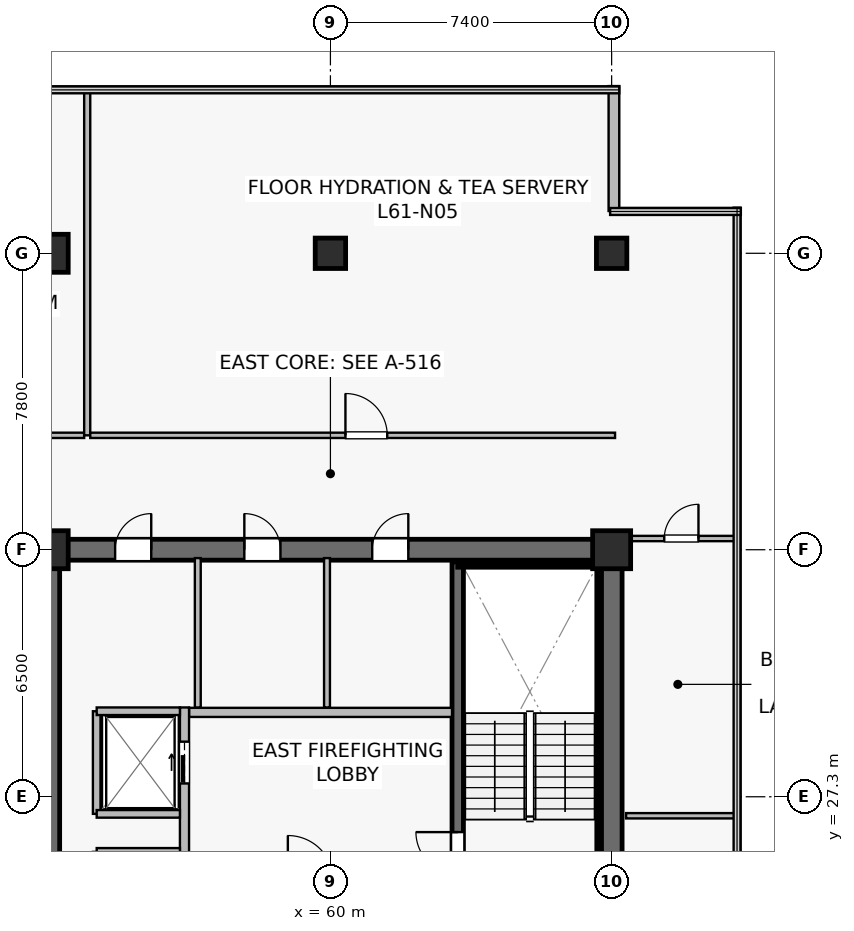
"""IFC4 building model, lengths in metres.
Left out: names, types, materials, properties, quantities, classifications, styles, units other than length and angle.
Written with IfcOpenShell. Run it as: python <this file> out.ifc"""

import sys

from ifc_helpers import new_model, si_unit, direction, frame, frame_2d, origin, origin_2d, place, context, subcontext, project, spatial, rectangle, extrude, source, transform, mapped, element, fill, save


model = new_model("IFC4")
c1 = context("Model", 3, precision=1e-05, world=origin(), true_north=direction((0.0, 1.0)))
c2 = subcontext(c1, "Body", "Model", "MODEL_VIEW")
j1 = project(units=[si_unit("LENGTHUNIT", "METRE"), si_unit("PLANEANGLEUNIT", "RADIAN")], contexts=[c1])
p1 = place(None, origin())
s1 = spatial("IfcSite", under=j1, at=p1, CompositionType="ELEMENT")
p2 = place(p1, origin())
s2 = spatial("IfcBuilding", under=s1, at=p2, CompositionType="ELEMENT")
p3 = place(p2, frame((0.0, 0.0, 254.7)))
s3 = spatial("IfcBuildingStorey", under=s2, at=p3, CompositionType="ELEMENT", Elevation=254.7)
p4 = place(p3, frame((52.325, 33.8, 0.0), z_axis=(0.0, 0.0, 1.0), x_axis=(1.0, 0.0, 0.0)))
e1 = element("IfcWall", 1, at=p4, inside=s3, PredefinedType="SHEAR", context=c2, shape_type="SweptSolid", body=[
    extrude(rectangle(XDim=15.35, YDim=0.55, at=frame_2d((7.675, 0.0))), origin(), (0.0, 0.0, 1.0), 3.8),
])
p5 = place(p4, frame((8.775, 0.0, 0.0)))
e2 = element("IfcOpeningElement", 2, at=p5, cuts=e1, PredefinedType="OPENING", context=c2, shape_type="SweptSolid", body=[
    extrude(rectangle(XDim=0.95, YDim=2.15, at=frame_2d((0.475, 1.075))), frame((0.0, 0.285, 0.0), z_axis=(0.0, -1.0, 0.0), x_axis=(1.0, 0.0, 0.0)), (0.0, 0.0, 1.0), 0.57),
])
p6 = place(p4, frame((5.41, 0.0, 0.0)))
e3 = element("IfcOpeningElement", 3, at=p6, cuts=e1, PredefinedType="OPENING", context=c2, shape_type="SweptSolid", body=[
    extrude(rectangle(XDim=0.95, YDim=2.15, at=frame_2d((0.475, 1.075))), frame((0.0, 0.285, 0.0), z_axis=(0.0, -1.0, 0.0), x_axis=(1.0, 0.0, 0.0)), (0.0, 0.0, 1.0), 0.57),
])
p7 = place(p4, frame((2.01, 0.0, 0.0)))
e4 = element("IfcOpeningElement", 4, at=p7, cuts=e1, PredefinedType="OPENING", context=c2, shape_type="SweptSolid", body=[
    extrude(rectangle(XDim=0.95, YDim=2.15, at=frame_2d((0.475, 1.075))), frame((0.0, 0.285, 0.0), z_axis=(0.0, -1.0, 0.0), x_axis=(1.0, 0.0, 0.0)), (0.0, 0.0, 1.0), 0.57),
])
p8 = place(p3, frame((52.6, 15.075, 0.0), z_axis=(0.0, 0.0, 1.0), x_axis=(0.0, 1.0, 0.0)))
e5 = element("IfcWall", 5, at=p8, inside=s3, PredefinedType="SHEAR", context=c2, shape_type="SweptSolid", body=[
    extrude(rectangle(XDim=18.45, YDim=0.55, at=frame_2d((9.225, 0.0))), origin(), (0.0, 0.0, 1.0), 3.8),
])
p9 = place(p8, frame((3.475, 0.0, 0.0)))
e6 = element("IfcOpeningElement", 6, at=p9, cuts=e5, PredefinedType="OPENING", context=c2, shape_type="SweptSolid", body=[
    extrude(rectangle(XDim=1.42, YDim=2.2, at=frame_2d((0.71, 1.1))), frame((0.0, 0.285, 0.0), z_axis=(0.0, -1.0, 0.0), x_axis=(1.0, 0.0, 0.0)), (0.0, 0.0, 1.0), 0.57),
])
p10 = place(p3, frame((67.4, 15.075, 0.0), z_axis=(0.0, 0.0, 1.0), x_axis=(0.0, 1.0, 0.0)))
e7 = element("IfcWall", 7, at=p10, inside=s3, PredefinedType="SHEAR", context=c2, shape_type="SweptSolid", body=[
    extrude(rectangle(XDim=18.45, YDim=0.55, at=frame_2d((9.225, 0.0))), origin(), (0.0, 0.0, 1.0), 3.8),
])
p11 = place(p3, frame((63.35, 24.85, 0.0), z_axis=(0.0, 0.0, 1.0), x_axis=(0.0, 1.0, 0.0)))
e8 = element("IfcWall", 8, at=p11, inside=s3, PredefinedType="SHEAR", context=c2, shape_type="SweptSolid", body=[
    extrude(rectangle(XDim=8.63, YDim=0.3, at=frame_2d((4.315, 0.0))), origin(), (0.0, 0.0, 1.0), 3.8),
])
p12 = place(p11, frame((0.42, 0.0, 0.0)))
e9 = element("IfcOpeningElement", 9, at=p12, cuts=e8, PredefinedType="OPENING", context=c2, shape_type="SweptSolid", body=[
    extrude(rectangle(XDim=1.1, YDim=2.15, at=frame_2d((0.55, 1.075))), frame((0.0, 0.16, 0.0), z_axis=(0.0, -1.0, 0.0), x_axis=(1.0, 0.0, 0.0)), (0.0, 0.0, 1.0), 0.32),
])
p13 = place(p3, frame((63.35, 33.4, 0.0), z_axis=(0.0, 0.0, 1.0), x_axis=(1.0, 0.0, 0.0)))
e10 = element("IfcWall", 10, at=p13, inside=s3, PredefinedType="SOLIDWALL", context=c2, shape_type="SweptSolid", body=[
    extrude(rectangle(XDim=3.72, YDim=0.12, at=frame_2d((1.86, 0.0))), origin(), (0.0, 0.0, 1.0), 3.8),
])
p14 = place(p3, frame((67.07, 25.0, 0.0), z_axis=(0.0, 0.0, 1.0), x_axis=(0.0, 1.0, 0.0)))
e11 = element("IfcWall", 11, at=p14, inside=s3, PredefinedType="SOLIDWALL", context=c2, shape_type="SweptSolid", body=[
    extrude(rectangle(XDim=8.32, YDim=0.12, at=frame_2d((4.16, 0.0))), origin(), (0.0, 0.0, 1.0), 3.8),
])
m1 = source(origin(), c2, "Body", "SweptSolid", [
    extrude(rectangle(XDim=1.0, YDim=1.0, at=origin_2d()), origin(), (0.0, 0.0, 1.0), 4.1),
])
for number, where, z_axis, x_axis in (
    (12, (52.6, 33.8, 0.0), (0.0, 0.0, 1.0), (1.0, 0.0, 0.0)),
    (13, (67.4, 33.8, 0.0), (0.0, 0.0, 1.0), (1.0, 0.0, 0.0)),
    (14, (52.6, 41.6, 0.0), (0.0, 0.0, 1.0), (1.0, 0.0, 0.0)),
):
    element("IfcColumn", number, at=place(p3, frame(where, z_axis=z_axis, x_axis=x_axis)), inside=s3, PredefinedType="COLUMN", context=c2, shape_type="MappedRepresentation", body=[
        mapped(m1, transform((0.0, 0.0, 0.0), scale=1.0)),
    ])
m2 = source(origin(), c2, "Body", "SweptSolid", [
    extrude(rectangle(XDim=0.8, YDim=0.8, at=origin_2d()), origin(), (0.0, 0.0, 1.0), 4.1),
])
for number, where, z_axis, x_axis in (
    (15, (60.0, 41.6, 0.0), (0.0, 0.0, 1.0), (1.0, 0.0, 0.0)),
    (16, (67.4, 41.6, 0.0), (0.0, 0.0, 1.0), (1.0, 0.0, 0.0)),
):
    element("IfcColumn", number, at=place(p3, frame(where, z_axis=z_axis, x_axis=x_axis)), inside=s3, PredefinedType="COLUMN", context=c2, shape_type="MappedRepresentation", body=[
        mapped(m2, transform((0.0, 0.0, 0.0), scale=1.0)),
    ])
p15 = place(p3, frame((67.46, 42.712, 0.0), z_axis=(0.0, 0.0, 1.0), x_axis=(0.0, 1.0, 0.0)))
e17 = element("IfcWall", 17, at=p15, inside=s3, PredefinedType="STANDARD", context=c2, shape_type="SweptSolid", body=[
    extrude(rectangle(XDim=3.288, YDim=0.28, at=frame_2d((1.644, 0.0))), origin(), (0.0, 0.0, 1.0), 3.8),
])
p16 = place(p3, frame((56.28, 29.52, 0.0), z_axis=(0.0, 0.0, 1.0), x_axis=(1.0, 0.0, 0.0)))
e18 = element("IfcWall", 18, at=p16, inside=s3, PredefinedType="SOLIDWALL", context=c2, shape_type="SweptSolid", body=[
    extrude(rectangle(XDim=6.92, YDim=0.24, at=frame_2d((3.46, 0.0))), origin(), (0.0, 0.0, 1.0), 3.197),
])
p17 = place(p3, frame((56.16, 22.8, 0.0), z_axis=(0.0, 0.0, 1.0), x_axis=(0.0, 1.0, 0.0)))
e19 = element("IfcWall", 19, at=p17, inside=s3, PredefinedType="SOLIDWALL", context=c2, shape_type="SweptSolid", body=[
    extrude(rectangle(XDim=6.85, YDim=0.24, at=frame_2d((3.425, 0.0))), origin(), (0.0, 0.0, 1.0), 2.935),
])
p18 = place(p17, frame((4.85, 0.0, 0.0)))
e20 = element("IfcOpeningElement", 20, at=p18, cuts=e19, PredefinedType="OPENING", context=c2, shape_type="SweptSolid", body=[
    extrude(rectangle(XDim=1.1, YDim=2.22, at=frame_2d((0.55, 1.11))), frame((0.0, 0.13, 0.0), z_axis=(0.0, -1.0, 0.0), x_axis=(1.0, 0.0, 0.0)), (0.0, 0.0, 1.0), 0.26),
])
p19 = place(p17, frame((1.0, 0.0, 0.0)))
e21 = element("IfcOpeningElement", 21, at=p19, cuts=e19, PredefinedType="OPENING", context=c2, shape_type="SweptSolid", body=[
    extrude(rectangle(XDim=1.2, YDim=2.22, at=frame_2d((0.6, 1.11))), frame((0.0, 0.13, 0.0), z_axis=(0.0, -1.0, 0.0), x_axis=(1.0, 0.0, 0.0)), (0.0, 0.0, 1.0), 0.26),
])
p20 = place(p3, frame((53.85, 26.85, 0.0), z_axis=(0.0, 0.0, 1.0), x_axis=(0.0, 1.0, 0.0)))
e22 = element("IfcWall", 22, at=p20, inside=s3, PredefinedType="SOLIDWALL", context=c2, shape_type="SweptSolid", body=[
    extrude(rectangle(XDim=2.7, YDim=0.2, at=frame_2d((1.35, 0.0))), origin(), (0.0, 0.0, 1.0), 3.8),
])
p21 = place(p3, frame((53.85, 29.55, 0.0), z_axis=(0.0, 0.0, 1.0), x_axis=(1.0, 0.0, 0.0)))
e23 = element("IfcWall", 23, at=p21, inside=s3, PredefinedType="SOLIDWALL", context=c2, shape_type="SweptSolid", body=[
    extrude(rectangle(XDim=2.19, YDim=0.2, at=frame_2d((1.095, 0.0))), origin(), (0.0, 0.0, 1.0), 3.8),
])
p22 = place(p3, frame((53.85, 26.85, 0.0), z_axis=(0.0, 0.0, 1.0), x_axis=(1.0, 0.0, 0.0)))
e24 = element("IfcWall", 24, at=p22, inside=s3, PredefinedType="SOLIDWALL", context=c2, shape_type="SweptSolid", body=[
    extrude(rectangle(XDim=2.19, YDim=0.2, at=frame_2d((1.095, 0.0))), origin(), (0.0, 0.0, 1.0), 3.197),
])
p23 = place(p3, frame((53.85, 25.85, 0.0), z_axis=(0.0, 0.0, 1.0), x_axis=(1.0, 0.0, 0.0)))
e25 = element("IfcWall", 25, at=p23, inside=s3, PredefinedType="SOLIDWALL", context=c2, shape_type="SweptSolid", body=[
    extrude(rectangle(XDim=2.19, YDim=0.2, at=frame_2d((1.095, 0.0))), origin(), (0.0, 0.0, 1.0), 3.8),
])
p24 = place(p3, frame((59.91, 29.65, 0.0), z_axis=(0.0, 0.0, 1.0), x_axis=(0.0, 1.0, 0.0)))
e26 = element("IfcWall", 26, at=p24, inside=s3, PredefinedType="PLUMBINGWALL", context=c2, shape_type="SweptSolid", body=[
    extrude(rectangle(XDim=3.93, YDim=0.155, at=frame_2d((1.965, 0.0))), origin(), (0.0, 0.0, 1.0), 3.197),
])
p25 = place(p3, frame((56.51, 29.65, 0.0), z_axis=(0.0, 0.0, 1.0), x_axis=(0.0, 1.0, 0.0)))
e27 = element("IfcWall", 27, at=p25, inside=s3, PredefinedType="PLUMBINGWALL", context=c2, shape_type="SweptSolid", body=[
    extrude(rectangle(XDim=3.93, YDim=0.155, at=frame_2d((1.965, 0.0))), origin(), (0.0, 0.0, 1.0), 3.8),
])
p26 = place(p3, frame((38.28, 36.81, 0.0), z_axis=(0.0, 0.0, 1.0), x_axis=(1.0, 0.0, 0.0)))
e28 = element("IfcWall", 28, at=p26, inside=s3, PredefinedType="PARTITIONING", context=c2, shape_type="SweptSolid", body=[
    extrude(rectangle(XDim=15.24, YDim=0.14, at=frame_2d((7.62, 0.0))), origin(), (0.0, 0.0, 1.0), 3.197),
])
p27 = place(p26, frame((5.86, 0.0, 0.0)))
e29 = element("IfcOpeningElement", 29, at=p27, cuts=e28, PredefinedType="OPENING", context=c2, shape_type="SweptSolid", body=[
    extrude(rectangle(XDim=1.1, YDim=2.18, at=frame_2d((0.55, 1.09))), frame((0.0, 0.08, 0.0), z_axis=(0.0, -1.0, 0.0), x_axis=(1.0, 0.0, 0.0)), (0.0, 0.0, 1.0), 0.16),
])
p28 = place(p3, frame((53.6, 36.81, 0.0), z_axis=(0.0, 0.0, 1.0), x_axis=(0.0, 1.0, 0.0)))
e30 = element("IfcWall", 30, at=p28, inside=s3, PredefinedType="PARTITIONING", context=c2, shape_type="SweptSolid", body=[
    extrude(rectangle(XDim=9.08, YDim=0.16, at=frame_2d((4.54, 0.0))), origin(), (0.0, 0.0, 1.0), 3.135),
])
p29 = place(p3, frame((53.68, 36.81, 0.0), z_axis=(0.0, 0.0, 1.0), x_axis=(1.0, 0.0, 0.0)))
e31 = element("IfcWall", 31, at=p29, inside=s3, PredefinedType="PARTITIONING", context=c2, shape_type="SweptSolid", body=[
    extrude(rectangle(XDim=13.81, YDim=0.14, at=frame_2d((6.905, 0.0))), origin(), (0.0, 0.0, 1.0), 3.197),
])
p30 = place(p29, frame((6.715, 0.0, 0.0)))
e32 = element("IfcOpeningElement", 32, at=p30, cuts=e31, PredefinedType="OPENING", context=c2, shape_type="SweptSolid", body=[
    extrude(rectangle(XDim=1.1, YDim=2.18, at=frame_2d((0.55, 1.09))), frame((0.0, 0.08, 0.0), z_axis=(0.0, -1.0, 0.0), x_axis=(1.0, 0.0, 0.0)), (0.0, 0.0, 1.0), 0.16),
])
p31 = place(p3, frame((67.78, 26.8, 0.0), z_axis=(0.0, 0.0, 1.0), x_axis=(1.0, 0.0, 0.0)))
e33 = element("IfcWall", 33, at=p31, inside=s3, PredefinedType="PARTITIONING", context=c2, shape_type="SweptSolid", body=[
    extrude(rectangle(XDim=2.91, YDim=0.14, at=frame_2d((1.455, 0.0))), origin(), (0.0, 0.0, 1.0), 3.8),
])
p32 = place(p3, frame((67.78, 34.095, 0.0), z_axis=(0.0, 0.0, 1.0), x_axis=(1.0, 0.0, 0.0)))
e34 = element("IfcWall", 34, at=p32, inside=s3, PredefinedType="PARTITIONING", context=c2, shape_type="SweptSolid", body=[
    extrude(rectangle(XDim=2.91, YDim=0.14, at=frame_2d((1.455, 0.0))), origin(), (0.0, 0.0, 1.0), 3.8),
])
p33 = place(p32, frame((1.005, 0.0, 0.0)))
e35 = element("IfcOpeningElement", 35, at=p33, cuts=e34, PredefinedType="OPENING", context=c2, shape_type="SweptSolid", body=[
    extrude(rectangle(XDim=0.9, YDim=2.1, at=frame_2d((0.45, 1.05))), frame((0.0, 0.08, 0.0), z_axis=(0.0, -1.0, 0.0), x_axis=(1.0, 0.0, 0.0)), (0.0, 0.0, 1.0), 0.16),
])
m3 = source(origin(), c2, "Body", "SweptSolid", [
    extrude(rectangle(XDim=1.1, YDim=2.15, at=frame_2d((0.55, 1.075))), frame((0.0, 0.025, 0.0), z_axis=(0.0, -1.0, 0.0), x_axis=(1.0, 0.0, 0.0)), (0.0, 0.0, 1.0), 0.05),
])
p34 = place(p12, origin())
e36 = element("IfcDoor", 36, at=p34, inside=s3, OperationType="SINGLE_SWING_RIGHT", PredefinedType="DOOR", context=c2, shape_type="MappedRepresentation", body=[
    mapped(m3, transform((0.0, 0.0, 0.0), scale=1.0)),
])
fill(e9, e36)
m4 = source(origin(), c2, "Body", "SweptSolid", [
    extrude(rectangle(XDim=1.1, YDim=2.22, at=frame_2d((0.55, 1.11))), frame((0.0, 0.025, 0.0), z_axis=(0.0, -1.0, 0.0), x_axis=(1.0, 0.0, 0.0)), (0.0, 0.0, 1.0), 0.05),
])
p35 = place(p18, origin())
e37 = element("IfcDoor", 37, at=p35, inside=s3, OperationType="SLIDING_TO_RIGHT", PredefinedType="USERDEFINED", context=c2, shape_type="MappedRepresentation", body=[
    mapped(m4, transform((0.0, 0.0, 0.0), scale=1.0)),
])
fill(e20, e37)
m5 = source(origin(), c2, "Body", "SweptSolid", [
    extrude(rectangle(XDim=0.95, YDim=2.15, at=frame_2d((0.475, 1.075))), frame((0.0, 0.025, 0.0), z_axis=(0.0, -1.0, 0.0), x_axis=(1.0, 0.0, 0.0)), (0.0, 0.0, 1.0), 0.05),
])
p36 = place(p5, origin())
e38 = element("IfcDoor", 38, at=p36, inside=s3, OperationType="SINGLE_SWING_RIGHT", PredefinedType="DOOR", context=c2, shape_type="MappedRepresentation", body=[
    mapped(m5, transform((0.0, 0.0, 0.0), scale=1.0)),
])
fill(e2, e38)
p37 = place(p6, origin())
e39 = element("IfcDoor", 39, at=p37, inside=s3, OperationType="SINGLE_SWING_LEFT", PredefinedType="DOOR", context=c2, shape_type="MappedRepresentation", body=[
    mapped(m5, transform((0.0, 0.0, 0.0), scale=1.0)),
])
fill(e3, e39)
p38 = place(p7, origin())
e40 = element("IfcDoor", 40, at=p38, inside=s3, OperationType="SINGLE_SWING_RIGHT", PredefinedType="DOOR", context=c2, shape_type="MappedRepresentation", body=[
    mapped(m5, transform((0.0, 0.0, 0.0), scale=1.0)),
])
fill(e4, e40)
m6 = source(origin(), c2, "Body", "SweptSolid", [
    extrude(rectangle(XDim=1.1, YDim=2.18, at=frame_2d((0.55, 1.09))), frame((0.0, 0.025, 0.0), z_axis=(0.0, -1.0, 0.0), x_axis=(1.0, 0.0, 0.0)), (0.0, 0.0, 1.0), 0.05),
])
p39 = place(p30, origin())
e41 = element("IfcDoor", 41, at=p39, inside=s3, OperationType="SINGLE_SWING_LEFT", PredefinedType="DOOR", context=c2, shape_type="MappedRepresentation", body=[
    mapped(m6, transform((0.0, 0.0, 0.0), scale=1.0)),
])
fill(e32, e41)
m7 = source(origin(), c2, "Body", "SweptSolid", [
    extrude(rectangle(XDim=0.9, YDim=2.1, at=frame_2d((0.45, 1.05))), frame((0.0, 0.025, 0.0), z_axis=(0.0, -1.0, 0.0), x_axis=(1.0, 0.0, 0.0)), (0.0, 0.0, 1.0), 0.05),
])
p40 = place(p33, origin())
e42 = element("IfcDoor", 42, at=p40, inside=s3, OperationType="SINGLE_SWING_RIGHT", PredefinedType="DOOR", context=c2, shape_type="MappedRepresentation", body=[
    mapped(m7, transform((0.0, 0.0, 0.0), scale=1.0)),
])
fill(e35, e42)
save(model, sys.argv[1])
